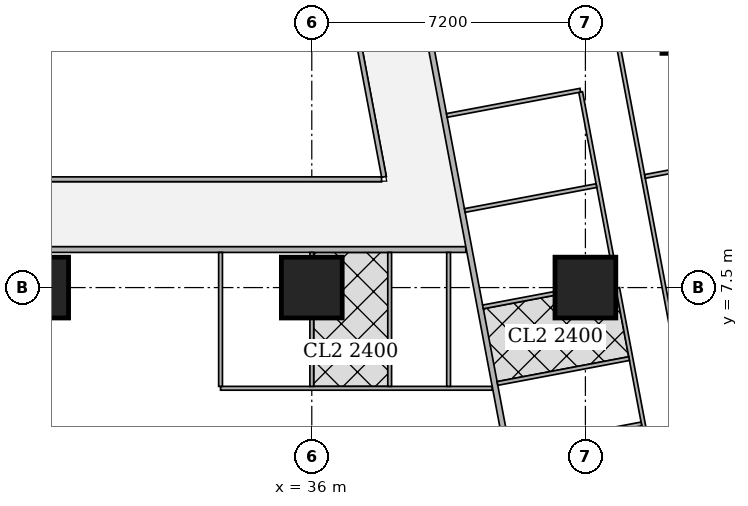
"""IFC4 building model, lengths in metres.
Left out: names, types, materials, properties, quantities, classifications, styles, units other than length and angle.
Written with IfcOpenShell. Run it as: python <this file> out.ifc"""

import sys

from ifc_helpers import new_model, si_unit, direction, frame, frame_2d, origin, origin_2d, place, context, subcontext, project, spatial, rectangle, extrude, element, fill, save


model = new_model("IFC4")
c1 = context("Model", 3, precision=1e-05, world=origin(), true_north=direction((0.0, 1.0)))
c2 = subcontext(c1, "Body", "Model", "MODEL_VIEW")
j1 = project(units=[si_unit("LENGTHUNIT", "METRE"), si_unit("PLANEANGLEUNIT", "RADIAN")], contexts=[c1])
p1 = place(None, origin())
s1 = spatial("IfcSite", under=j1, at=p1, CompositionType="ELEMENT")
p2 = place(p1, origin())
s2 = spatial("IfcBuilding", under=s1, at=p2, CompositionType="ELEMENT")
p3 = place(p2, frame((0.0, 0.0, 111.65)))
s3 = spatial("IfcBuildingStorey", under=s2, at=p3, CompositionType="ELEMENT", Elevation=111.65)
for number, where, z_axis, x_axis in (
    (1, (28.8, 7.5, 0.0), (0.0, 0.0, 1.0), (1.0, 0.0, 0.0)),
    (2, (36.0, 7.5, 0.0), (0.0, 0.0, 1.0), (1.0, 0.0, 0.0)),
    (3, (43.2, 7.5, 0.0), (0.0, 0.0, 1.0), (1.0, 0.0, 0.0)),
):
    element("IfcColumn", number, at=place(p3, frame(where, z_axis=z_axis, x_axis=x_axis)), inside=s3, PredefinedType="COLUMN", context=c2, shape_type="SweptSolid", body=[
        extrude(rectangle(XDim=1.6, YDim=1.6, at=origin_2d()), origin(), (0.0, 0.0, 1.0), 3.75),
    ])
p4 = place(p3, frame((46.314, 14.763, 0.0), z_axis=(0.0, 0.0, 1.0), x_axis=(1.0, 0.0, 0.0)))
e4 = element("IfcColumn", 4, at=p4, inside=s3, PredefinedType="COLUMN", context=c2, shape_type="SweptSolid", body=[
    extrude(rectangle(XDim=2.2, YDim=2.2, at=origin_2d()), origin(), (0.0, 0.0, 1.0), 3.75),
])
p5 = place(p3, frame((50.653, 2.703, 0.0), z_axis=(0.0, 0.0, 1.0), x_axis=(-0.185612026696, 0.982623109613, 0.0)))
e5 = element("IfcWall", 5, at=p5, inside=s3, PredefinedType="SOLIDWALL", context=c2, shape_type="SweptSolid", body=[
    extrude(rectangle(XDim=41.393, YDim=0.2, at=frame_2d((20.697, 0.0))), origin(), (0.0, 0.0, 1.0), 3.5),
])
p6 = place(p5, frame((1.633, 0.0, 0.9)))
e6 = element("IfcOpeningElement", 6, at=p6, cuts=e5, PredefinedType="OPENING", context=c2, shape_type="SweptSolid", body=[
    extrude(rectangle(XDim=1.8, YDim=1.5, at=frame_2d((0.9, 0.75))), frame((0.0, 0.11, 0.0), z_axis=(0.0, -1.0, 0.0), x_axis=(1.0, 0.0, 0.0)), (0.0, 0.0, 1.0), 0.22),
])
p7 = place(p5, frame((6.032, 0.0, 0.9)))
e7 = element("IfcOpeningElement", 7, at=p7, cuts=e5, PredefinedType="OPENING", context=c2, shape_type="SweptSolid", body=[
    extrude(rectangle(XDim=1.8, YDim=1.5, at=frame_2d((0.9, 0.75))), frame((0.0, 0.11, 0.0), z_axis=(0.0, -1.0, 0.0), x_axis=(1.0, 0.0, 0.0)), (0.0, 0.0, 1.0), 0.22),
])
p8 = place(p5, frame((9.848, 0.0, 0.9)))
e8 = element("IfcOpeningElement", 8, at=p8, cuts=e5, PredefinedType="OPENING", context=c2, shape_type="SweptSolid", body=[
    extrude(rectangle(XDim=1.8, YDim=1.5, at=frame_2d((0.9, 0.75))), frame((0.0, 0.11, 0.0), z_axis=(0.0, -1.0, 0.0), x_axis=(1.0, 0.0, 0.0)), (0.0, 0.0, 1.0), 0.22),
])
p9 = place(p5, frame((13.664, 0.0, 0.9)))
e9 = element("IfcOpeningElement", 9, at=p9, cuts=e5, PredefinedType="OPENING", context=c2, shape_type="SweptSolid", body=[
    extrude(rectangle(XDim=1.8, YDim=1.5, at=frame_2d((0.9, 0.75))), frame((0.0, 0.11, 0.0), z_axis=(0.0, -1.0, 0.0), x_axis=(1.0, 0.0, 0.0)), (0.0, 0.0, 1.0), 0.22),
])
p10 = place(p5, frame((17.481, 0.0, 0.9)))
e10 = element("IfcOpeningElement", 10, at=p10, cuts=e5, PredefinedType="OPENING", context=c2, shape_type="SweptSolid", body=[
    extrude(rectangle(XDim=1.8, YDim=1.5, at=frame_2d((0.9, 0.75))), frame((0.0, 0.11, 0.0), z_axis=(0.0, -1.0, 0.0), x_axis=(1.0, 0.0, 0.0)), (0.0, 0.0, 1.0), 0.22),
])
p11 = place(p5, frame((21.297, 0.0, 0.9)))
e11 = element("IfcOpeningElement", 11, at=p11, cuts=e5, PredefinedType="OPENING", context=c2, shape_type="SweptSolid", body=[
    extrude(rectangle(XDim=1.8, YDim=1.5, at=frame_2d((0.9, 0.75))), frame((0.0, 0.11, 0.0), z_axis=(0.0, -1.0, 0.0), x_axis=(1.0, 0.0, 0.0)), (0.0, 0.0, 1.0), 0.22),
])
p12 = place(p5, frame((25.113, 0.0, 0.9)))
e12 = element("IfcOpeningElement", 12, at=p12, cuts=e5, PredefinedType="OPENING", context=c2, shape_type="SweptSolid", body=[
    extrude(rectangle(XDim=1.8, YDim=1.5, at=frame_2d((0.9, 0.75))), frame((0.0, 0.11, 0.0), z_axis=(0.0, -1.0, 0.0), x_axis=(1.0, 0.0, 0.0)), (0.0, 0.0, 1.0), 0.22),
])
p13 = place(p5, frame((28.93, 0.0, 0.9)))
e13 = element("IfcOpeningElement", 13, at=p13, cuts=e5, PredefinedType="OPENING", context=c2, shape_type="SweptSolid", body=[
    extrude(rectangle(XDim=1.8, YDim=1.5, at=frame_2d((0.9, 0.75))), frame((0.0, 0.11, 0.0), z_axis=(0.0, -1.0, 0.0), x_axis=(1.0, 0.0, 0.0)), (0.0, 0.0, 1.0), 0.22),
])
p14 = place(p5, frame((32.746, 0.0, 0.9)))
e14 = element("IfcOpeningElement", 14, at=p14, cuts=e5, PredefinedType="OPENING", context=c2, shape_type="SweptSolid", body=[
    extrude(rectangle(XDim=1.8, YDim=1.5, at=frame_2d((0.9, 0.75))), frame((0.0, 0.11, 0.0), z_axis=(0.0, -1.0, 0.0), x_axis=(1.0, 0.0, 0.0)), (0.0, 0.0, 1.0), 0.22),
])
p15 = place(p5, frame((36.481, 0.0, 0.9)))
e15 = element("IfcOpeningElement", 15, at=p15, cuts=e5, PredefinedType="OPENING", context=c2, shape_type="SweptSolid", body=[
    extrude(rectangle(XDim=1.8, YDim=1.5, at=frame_2d((0.9, 0.75))), frame((0.0, 0.11, 0.0), z_axis=(0.0, -1.0, 0.0), x_axis=(1.0, 0.0, 0.0)), (0.0, 0.0, 1.0), 0.22),
])
p16 = place(p3, frame((40.053, 8.5, 0.0), z_axis=(0.0, 0.0, 1.0), x_axis=(-1.0, 0.0, 0.0)))
e16 = element("IfcWall", 16, at=p16, inside=s3, PredefinedType="SOLIDWALL", context=c2, shape_type="SweptSolid", body=[
    extrude(rectangle(XDim=31.703, YDim=0.15, at=frame_2d((15.852, 0.0))), origin(), (0.0, 0.0, 1.0), 3.5),
])
p17 = place(p16, frame((28.103, 0.0, 0.0)))
e17 = element("IfcOpeningElement", 17, at=p17, cuts=e16, PredefinedType="OPENING", context=c2, shape_type="SweptSolid", body=[
    extrude(rectangle(XDim=1.0, YDim=2.1, at=frame_2d((0.5, 1.05))), frame((0.0, 0.085, 0.0), z_axis=(0.0, -1.0, 0.0), x_axis=(1.0, 0.0, 0.0)), (0.0, 0.0, 1.0), 0.17),
])
p18 = place(p16, frame((19.754, 0.0, 0.0)))
e18 = element("IfcOpeningElement", 18, at=p18, cuts=e16, PredefinedType="OPENING", context=c2, shape_type="SweptSolid", body=[
    extrude(rectangle(XDim=1.0, YDim=2.1, at=frame_2d((0.5, 1.05))), frame((0.0, 0.085, 0.0), z_axis=(0.0, -1.0, 0.0), x_axis=(1.0, 0.0, 0.0)), (0.0, 0.0, 1.0), 0.17),
])
p19 = place(p16, frame((8.353, 0.0, 0.0)))
e19 = element("IfcOpeningElement", 19, at=p19, cuts=e16, PredefinedType="OPENING", context=c2, shape_type="SweptSolid", body=[
    extrude(rectangle(XDim=1.0, YDim=2.1, at=frame_2d((0.5, 1.05))), frame((0.0, 0.085, 0.0), z_axis=(0.0, -1.0, 0.0), x_axis=(1.0, 0.0, 0.0)), (0.0, 0.0, 1.0), 0.17),
])
p20 = place(p3, frame((33.127, 45.65, 0.0), z_axis=(0.0, 0.0, 1.0), x_axis=(0.185598547723, -0.98262565562, 0.0)))
e20 = element("IfcWall", 20, at=p20, inside=s3, PredefinedType="SOLIDWALL", context=c2, shape_type="SweptSolid", body=[
    extrude(rectangle(XDim=47.118, YDim=0.15, at=frame_2d((23.559, 0.0))), origin(), (0.0, 0.0, 1.0), 2.2),
])
p21 = place(p20, frame((20.373, 0.0, 0.0)))
e21 = element("IfcOpeningElement", 21, at=p21, cuts=e20, PredefinedType="OPENING", context=c2, shape_type="SweptSolid", body=[
    extrude(rectangle(XDim=1.0, YDim=2.1, at=frame_2d((0.5, 1.05))), frame((0.0, 0.085, 0.0), z_axis=(0.0, -1.0, 0.0), x_axis=(1.0, 0.0, 0.0)), (0.0, 0.0, 1.0), 0.17),
])
p22 = place(p20, frame((24.188, 0.0, 0.0)))
e22 = element("IfcOpeningElement", 22, at=p22, cuts=e20, PredefinedType="OPENING", context=c2, shape_type="SweptSolid", body=[
    extrude(rectangle(XDim=1.0, YDim=2.1, at=frame_2d((0.5, 1.05))), frame((0.0, 0.085, 0.0), z_axis=(0.0, -1.0, 0.0), x_axis=(1.0, 0.0, 0.0)), (0.0, 0.0, 1.0), 0.17),
])
p23 = place(p20, frame((32.608, 0.0, 0.0)))
e23 = element("IfcOpeningElement", 23, at=p23, cuts=e20, PredefinedType="OPENING", context=c2, shape_type="SweptSolid", body=[
    extrude(rectangle(XDim=1.0, YDim=2.1, at=frame_2d((0.5, 1.05))), frame((0.0, 0.085, 0.0), z_axis=(0.0, -1.0, 0.0), x_axis=(1.0, 0.0, 0.0)), (0.0, 0.0, 1.0), 0.17),
])
p24 = place(p3, frame((40.747, 4.85, 0.0), z_axis=(0.0, 0.0, 1.0), x_axis=(-1.0, 0.0, 0.0)))
e24 = element("IfcWall", 24, at=p24, inside=s3, PredefinedType="PARTITIONING", context=c2, shape_type="SweptSolid", body=[
    extrude(rectangle(XDim=7.148, YDim=0.1, at=frame_2d((3.574, 0.0))), origin(), (0.0, 0.0, 1.0), 3.5),
])
p25 = place(p24, frame((5.498, 0.0, 0.0)))
e25 = element("IfcOpeningElement", 25, at=p25, cuts=e24, PredefinedType="OPENING", context=c2, shape_type="SweptSolid", body=[
    extrude(rectangle(XDim=0.9, YDim=2.1, at=frame_2d((0.45, 1.05))), frame((0.0, 0.06, 0.0), z_axis=(0.0, -1.0, 0.0), x_axis=(1.0, 0.0, 0.0)), (0.0, 0.0, 1.0), 0.12),
])
p26 = place(p24, frame((3.272, 0.0, 0.0)))
e26 = element("IfcOpeningElement", 26, at=p26, cuts=e24, PredefinedType="OPENING", context=c2, shape_type="SweptSolid", body=[
    extrude(rectangle(XDim=0.9, YDim=2.1, at=frame_2d((0.45, 1.05))), frame((0.0, 0.06, 0.0), z_axis=(0.0, -1.0, 0.0), x_axis=(1.0, 0.0, 0.0)), (0.0, 0.0, 1.0), 0.12),
])
p27 = place(p24, frame((0.15, 0.0, 0.0)))
e27 = element("IfcOpeningElement", 27, at=p27, cuts=e24, PredefinedType="OPENING", context=c2, shape_type="SweptSolid", body=[
    extrude(rectangle(XDim=0.9, YDim=2.1, at=frame_2d((0.45, 1.05))), frame((0.0, 0.06, 0.0), z_axis=(0.0, -1.0, 0.0), x_axis=(1.0, 0.0, 0.0)), (0.0, 0.0, 1.0), 0.12),
])
p28 = place(p24, frame((1.472, 0.0, 0.0)))
e28 = element("IfcOpeningElement", 28, at=p28, cuts=e24, PredefinedType="OPENING", context=c2, shape_type="SweptSolid", body=[
    extrude(rectangle(XDim=0.9, YDim=2.1, at=frame_2d((0.45, 1.05))), frame((0.0, 0.06, 0.0), z_axis=(0.0, -1.0, 0.0), x_axis=(1.0, 0.0, 0.0)), (0.0, 0.0, 1.0), 0.12),
])
p29 = place(p3, frame((33.599, 4.9, 0.0), z_axis=(0.0, 0.0, 1.0), x_axis=(0.0, 1.0, 0.0)))
e29 = element("IfcWall", 29, at=p29, inside=s3, PredefinedType="PARTITIONING", context=c2, shape_type="SweptSolid", body=[
    extrude(rectangle(XDim=3.525, YDim=0.1, at=frame_2d((1.763, 0.0))), origin(), (0.0, 0.0, 1.0), 3.5),
])
p30 = place(p3, frame((36.0, 4.9, 0.0), z_axis=(0.0, 0.0, 1.0), x_axis=(0.0, 1.0, 0.0)))
e30 = element("IfcWall", 30, at=p30, inside=s3, PredefinedType="PARTITIONING", context=c2, shape_type="SweptSolid", body=[
    extrude(rectangle(XDim=1.799, YDim=0.1, at=frame_2d((0.899, 0.0))), origin(), (0.0, 0.0, 1.0), 3.5),
])
p31 = place(p3, frame((36.0, 8.301, 0.0), z_axis=(0.0, 0.0, 1.0), x_axis=(0.0, 1.0, 0.0)))
e31 = element("IfcWall", 31, at=p31, inside=s3, PredefinedType="PARTITIONING", context=c2, shape_type="SweptSolid", body=[
    extrude(rectangle(XDim=0.124, YDim=0.1, at=frame_2d((0.062, 0.0))), origin(), (0.0, 0.0, 1.0), 3.5),
])
for number, where, z_axis, x_axis in (
    (32, (39.6, 4.9, 0.0), (0.0, 0.0, 1.0), (0.0, 1.0, 0.0)),
    (33, (38.05, 4.9, 0.0), (0.0, 0.0, 1.0), (0.0, 1.0, 0.0)),
):
    element("IfcWall", number, at=place(p3, frame(where, z_axis=z_axis, x_axis=x_axis)), inside=s3, PredefinedType="PARTITIONING", context=c2, shape_type="SweptSolid", body=[
        extrude(rectangle(XDim=3.525, YDim=0.1, at=frame_2d((1.763, 0.0))), origin(), (0.0, 0.0, 1.0), 3.5),
    ])
p32 = place(p3, frame((44.08, 13.794, 0.0), z_axis=(0.0, 0.0, 1.0), x_axis=(0.185608455357, -0.982623784212, 0.0)))
e34 = element("IfcWall", 34, at=p32, inside=s3, PredefinedType="PARTITIONING", context=c2, shape_type="SweptSolid", body=[
    extrude(rectangle(XDim=10.909, YDim=0.1, at=frame_2d((5.455, 0.0))), origin(), (0.0, 0.0, 1.0), 3.5),
])
p33 = place(p32, frame((1.094, 0.0, 0.0)))
e35 = element("IfcOpeningElement", 35, at=p33, cuts=e34, PredefinedType="OPENING", context=c2, shape_type="SweptSolid", body=[
    extrude(rectangle(XDim=0.9, YDim=2.1, at=frame_2d((0.45, 1.05))), frame((0.0, 0.06, 0.0), z_axis=(0.0, -1.0, 0.0), x_axis=(1.0, 0.0, 0.0)), (0.0, 0.0, 1.0), 0.12),
])
p34 = place(p32, frame((3.639, 0.0, 0.0)))
e36 = element("IfcOpeningElement", 36, at=p34, cuts=e34, PredefinedType="OPENING", context=c2, shape_type="SweptSolid", body=[
    extrude(rectangle(XDim=0.9, YDim=2.1, at=frame_2d((0.45, 1.05))), frame((0.0, 0.06, 0.0), z_axis=(0.0, -1.0, 0.0), x_axis=(1.0, 0.0, 0.0)), (0.0, 0.0, 1.0), 0.12),
])
p35 = place(p32, frame((8.05, 0.0, 0.0)))
e37 = element("IfcOpeningElement", 37, at=p35, cuts=e34, PredefinedType="OPENING", context=c2, shape_type="SweptSolid", body=[
    extrude(rectangle(XDim=0.9, YDim=2.1, at=frame_2d((0.45, 1.05))), frame((0.0, 0.06, 0.0), z_axis=(0.0, -1.0, 0.0), x_axis=(1.0, 0.0, 0.0)), (0.0, 0.0, 1.0), 0.12),
])
p36 = place(p3, frame((43.076, 12.644, 0.0), z_axis=(0.0, 0.0, 1.0), x_axis=(0.185705350074, -0.982605476757, 0.0)))
e38 = element("IfcWall", 38, at=p36, inside=s3, PredefinedType="PARTITIONING", context=c2, shape_type="SweptSolid", body=[
    extrude(rectangle(XDim=4.411, YDim=0.1, at=frame_2d((2.205, 0.0))), origin(), (0.0, 0.0, 1.0), 3.5),
])
p37 = place(p36, frame((0.773, 0.0, 0.0)))
e39 = element("IfcOpeningElement", 39, at=p37, cuts=e38, PredefinedType="OPENING", context=c2, shape_type="SweptSolid", body=[
    extrude(rectangle(XDim=0.9, YDim=2.1, at=frame_2d((0.45, 1.05))), frame((0.0, 0.06, 0.0), z_axis=(0.0, -1.0, 0.0), x_axis=(1.0, 0.0, 0.0)), (0.0, 0.0, 1.0), 0.12),
])
p38 = place(p3, frame((44.049, 7.491, 0.0), z_axis=(0.0, 0.0, 1.0), x_axis=(0.185628828844, -0.982619935632, 0.0)))
e40 = element("IfcWall", 40, at=p38, inside=s3, PredefinedType="PARTITIONING", context=c2, shape_type="SweptSolid", body=[
    extrude(rectangle(XDim=4.75, YDim=0.1, at=frame_2d((2.375, 0.0))), origin(), (0.0, 0.0, 1.0), 3.5),
])
p39 = place(p38, frame((0.8, 0.0, 0.0)))
e41 = element("IfcOpeningElement", 41, at=p39, cuts=e40, PredefinedType="OPENING", context=c2, shape_type="SweptSolid", body=[
    extrude(rectangle(XDim=0.9, YDim=2.1, at=frame_2d((0.45, 1.05))), frame((0.0, 0.06, 0.0), z_axis=(0.0, -1.0, 0.0), x_axis=(1.0, 0.0, 0.0)), (0.0, 0.0, 1.0), 0.12),
])
p40 = place(p38, frame((2.316, 0.0, 0.0)))
e42 = element("IfcOpeningElement", 42, at=p40, cuts=e40, PredefinedType="OPENING", context=c2, shape_type="SweptSolid", body=[
    extrude(rectangle(XDim=0.9, YDim=2.1, at=frame_2d((0.45, 1.05))), frame((0.0, 0.06, 0.0), z_axis=(0.0, -1.0, 0.0), x_axis=(1.0, 0.0, 0.0)), (0.0, 0.0, 1.0), 0.12),
])
p41 = place(p3, frame((48.943, 11.213, 0.0), z_axis=(0.0, 0.0, 1.0), x_axis=(-0.982623519589, -0.185609856287, 0.0)))
e43 = element("IfcWall", 43, at=p41, inside=s3, PredefinedType="PARTITIONING", context=c2, shape_type="SweptSolid", body=[
    extrude(rectangle(XDim=4.25, YDim=0.1, at=frame_2d((2.125, 0.0))), origin(), (0.0, 0.0, 1.0), 2.2),
])
p42 = place(p3, frame((43.067, 12.693, 0.0), z_axis=(0.0, 0.0, 1.0), x_axis=(-0.982598214409, -0.185743772548, 0.0)))
e44 = element("IfcWall", 44, at=p42, inside=s3, PredefinedType="PARTITIONING", context=c2, shape_type="SweptSolid", body=[
    extrude(rectangle(XDim=3.575, YDim=0.1, at=frame_2d((1.788, 0.0))), origin(), (0.0, 0.0, 1.0), 3.5),
])
p43 = place(p3, frame((43.49, 10.183, 0.0), z_axis=(0.0, 0.0, 1.0), x_axis=(-0.982588017646, -0.185797706064, 0.0)))
e45 = element("IfcWall", 45, at=p43, inside=s3, PredefinedType="PARTITIONING", context=c2, shape_type="SweptSolid", body=[
    extrude(rectangle(XDim=3.525, YDim=0.1, at=frame_2d((1.763, 0.0))), origin(), (0.0, 0.0, 1.0), 3.5),
])
p44 = place(p43, frame((1.325, 0.0, 0.0)))
e46 = element("IfcOpeningElement", 46, at=p44, cuts=e45, PredefinedType="OPENING", context=c2, shape_type="SweptSolid", body=[
    extrude(rectangle(XDim=0.9, YDim=2.1, at=frame_2d((0.45, 1.05))), frame((0.0, 0.06, 0.0), z_axis=(0.0, -1.0, 0.0), x_axis=(1.0, 0.0, 0.0)), (0.0, 0.0, 1.0), 0.12),
])
p45 = place(p3, frame((42.39, 7.347, 0.0), z_axis=(0.0, 0.0, 1.0), x_axis=(-0.982633642782, -0.185556255819, 0.0)))
e47 = element("IfcWall", 47, at=p45, inside=s3, PredefinedType="PARTITIONING", context=c2, shape_type="SweptSolid", body=[
    extrude(rectangle(XDim=1.918, YDim=0.1, at=frame_2d((0.959, 0.0))), origin(), (0.0, 0.0, 1.0), 3.5),
])
p46 = place(p3, frame((44.35, 5.631, 0.0), z_axis=(0.0, 0.0, 1.0), x_axis=(-0.982638553676, -0.185530247748, 0.0)))
e48 = element("IfcWall", 48, at=p46, inside=s3, PredefinedType="PARTITIONING", context=c2, shape_type="SweptSolid", body=[
    extrude(rectangle(XDim=3.525, YDim=0.1, at=frame_2d((1.763, 0.0))), origin(), (0.0, 0.0, 1.0), 3.5),
])
p47 = place(p3, frame((41.21, 3.258, 0.0), z_axis=(0.0, 0.0, 1.0), x_axis=(0.982638553676, 0.185530247748, 0.0)))
e49 = element("IfcWall", 49, at=p47, inside=s3, PredefinedType="PARTITIONING", context=c2, shape_type="SweptSolid", body=[
    extrude(rectangle(XDim=3.525, YDim=0.1, at=frame_2d((1.763, 0.0))), origin(), (0.0, 0.0, 1.0), 3.5),
])
p48 = place(p47, frame((1.65, 0.0, 0.0)))
e50 = element("IfcOpeningElement", 50, at=p48, cuts=e49, PredefinedType="OPENING", context=c2, shape_type="SweptSolid", body=[
    extrude(rectangle(XDim=0.9, YDim=2.1, at=frame_2d((0.45, 1.05))), frame((0.0, 0.06, 0.0), z_axis=(0.0, -1.0, 0.0), x_axis=(1.0, 0.0, 0.0)), (0.0, 0.0, 1.0), 0.12),
])
p49 = place(p3, frame((28.95, 10.35, 0.0), z_axis=(0.0, 0.0, 1.0), x_axis=(1.0, 0.0, 0.0)))
e51 = element("IfcWall", 51, at=p49, inside=s3, PredefinedType="PARTITIONING", context=c2, shape_type="SweptSolid", body=[
    extrude(rectangle(XDim=8.886, YDim=0.125, at=frame_2d((4.443, 0.0))), origin(), (0.0, 0.0, 1.0), 3.5),
])
p50 = place(p3, frame((37.9, 10.413, 0.0), z_axis=(0.0, 0.0, 1.0), x_axis=(-0.185513629891, 0.982641691119, 0.0)))
e52 = element("IfcWall", 52, at=p50, inside=s3, PredefinedType="PARTITIONING", context=c2, shape_type="SweptSolid", body=[
    extrude(rectangle(XDim=4.668, YDim=0.125, at=frame_2d((2.334, 0.0))), origin(), (0.0, 0.0, 1.0), 3.5),
])
p51 = place(p50, frame((0.708, 0.0, 0.0)))
e53 = element("IfcOpeningElement", 53, at=p51, cuts=e52, PredefinedType="OPENING", context=c2, shape_type="SweptSolid", body=[
    extrude(rectangle(XDim=1.0, YDim=2.1, at=frame_2d((0.5, 1.05))), frame((0.0, 0.073, 0.0), z_axis=(0.0, -1.0, 0.0), x_axis=(1.0, 0.0, 0.0)), (0.0, 0.0, 1.0), 0.145),
])
p52 = place(p25, origin())
e54 = element("IfcDoor", 54, at=p52, inside=s3, OperationType="SINGLE_SWING_LEFT", PredefinedType="DOOR", context=c2, shape_type="SweptSolid", body=[
    extrude(rectangle(XDim=0.9, YDim=2.1, at=frame_2d((0.45, 1.05))), frame((0.0, 0.025, 0.0), z_axis=(0.0, -1.0, 0.0), x_axis=(1.0, 0.0, 0.0)), (0.0, 0.0, 1.0), 0.05),
])
fill(e25, e54)
p53 = place(p26, origin())
e55 = element("IfcDoor", 55, at=p53, inside=s3, OperationType="SINGLE_SWING_RIGHT", PredefinedType="DOOR", context=c2, shape_type="SweptSolid", body=[
    extrude(rectangle(XDim=0.9, YDim=2.1, at=frame_2d((0.45, 1.05))), frame((0.0, 0.025, 0.0), z_axis=(0.0, -1.0, 0.0), x_axis=(1.0, 0.0, 0.0)), (0.0, 0.0, 1.0), 0.05),
])
fill(e26, e55)
p54 = place(p27, origin())
e56 = element("IfcDoor", 56, at=p54, inside=s3, OperationType="SINGLE_SWING_RIGHT", PredefinedType="DOOR", context=c2, shape_type="SweptSolid", body=[
    extrude(rectangle(XDim=0.9, YDim=2.1, at=frame_2d((0.45, 1.05))), frame((0.0, 0.025, 0.0), z_axis=(0.0, -1.0, 0.0), x_axis=(1.0, 0.0, 0.0)), (0.0, 0.0, 1.0), 0.05),
])
fill(e27, e56)
p55 = place(p28, origin())
e57 = element("IfcDoor", 57, at=p55, inside=s3, OperationType="SINGLE_SWING_LEFT", PredefinedType="DOOR", context=c2, shape_type="SweptSolid", body=[
    extrude(rectangle(XDim=0.9, YDim=2.1, at=frame_2d((0.45, 1.05))), frame((0.0, 0.025, 0.0), z_axis=(0.0, -1.0, 0.0), x_axis=(1.0, 0.0, 0.0)), (0.0, 0.0, 1.0), 0.05),
])
fill(e28, e57)
p56 = place(p19, origin())
e58 = element("IfcDoor", 58, at=p56, inside=s3, OperationType="SINGLE_SWING_RIGHT", PredefinedType="DOOR", context=c2, shape_type="SweptSolid", body=[
    extrude(rectangle(XDim=1.0, YDim=2.1, at=frame_2d((0.5, 1.05))), frame((0.0, 0.025, 0.0), z_axis=(0.0, -1.0, 0.0), x_axis=(1.0, 0.0, 0.0)), (0.0, 0.0, 1.0), 0.05),
])
fill(e19, e58)
p57 = place(p33, origin())
e59 = element("IfcDoor", 59, at=p57, inside=s3, OperationType="SINGLE_SWING_LEFT", PredefinedType="DOOR", context=c2, shape_type="SweptSolid", body=[
    extrude(rectangle(XDim=0.9, YDim=2.1, at=frame_2d((0.45, 1.05))), frame((0.0, 0.025, 0.0), z_axis=(0.0, -1.0, 0.0), x_axis=(1.0, 0.0, 0.0)), (0.0, 0.0, 1.0), 0.05),
])
fill(e35, e59)
p58 = place(p34, origin())
e60 = element("IfcDoor", 60, at=p58, inside=s3, OperationType="SINGLE_SWING_LEFT", PredefinedType="DOOR", context=c2, shape_type="SweptSolid", body=[
    extrude(rectangle(XDim=0.9, YDim=2.1, at=frame_2d((0.45, 1.05))), frame((0.0, 0.025, 0.0), z_axis=(0.0, -1.0, 0.0), x_axis=(1.0, 0.0, 0.0)), (0.0, 0.0, 1.0), 0.05),
])
fill(e36, e60)
p59 = place(p37, origin())
e61 = element("IfcDoor", 61, at=p59, inside=s3, OperationType="SINGLE_SWING_RIGHT", PredefinedType="DOOR", context=c2, shape_type="SweptSolid", body=[
    extrude(rectangle(XDim=0.9, YDim=2.1, at=frame_2d((0.45, 1.05))), frame((0.0, 0.025, 0.0), z_axis=(0.0, -1.0, 0.0), x_axis=(1.0, 0.0, 0.0)), (0.0, 0.0, 1.0), 0.05),
])
fill(e39, e61)
p60 = place(p39, origin())
e62 = element("IfcDoor", 62, at=p60, inside=s3, OperationType="SINGLE_SWING_LEFT", PredefinedType="DOOR", context=c2, shape_type="SweptSolid", body=[
    extrude(rectangle(XDim=0.9, YDim=2.1, at=frame_2d((0.45, 1.05))), frame((0.0, 0.025, 0.0), z_axis=(0.0, -1.0, 0.0), x_axis=(1.0, 0.0, 0.0)), (0.0, 0.0, 1.0), 0.05),
])
fill(e41, e62)
p61 = place(p40, origin())
e63 = element("IfcDoor", 63, at=p61, inside=s3, OperationType="SINGLE_SWING_LEFT", PredefinedType="DOOR", context=c2, shape_type="SweptSolid", body=[
    extrude(rectangle(XDim=0.9, YDim=2.1, at=frame_2d((0.45, 1.05))), frame((0.0, 0.025, 0.0), z_axis=(0.0, -1.0, 0.0), x_axis=(1.0, 0.0, 0.0)), (0.0, 0.0, 1.0), 0.05),
])
fill(e42, e63)
p62 = place(p23, origin())
e64 = element("IfcDoor", 64, at=p62, inside=s3, OperationType="SINGLE_SWING_LEFT", PredefinedType="DOOR", context=c2, shape_type="SweptSolid", body=[
    extrude(rectangle(XDim=1.0, YDim=2.1, at=frame_2d((0.5, 1.05))), frame((0.0, 0.025, 0.0), z_axis=(0.0, -1.0, 0.0), x_axis=(1.0, 0.0, 0.0)), (0.0, 0.0, 1.0), 0.05),
])
fill(e23, e64)
p63 = place(p44, origin())
e65 = element("IfcDoor", 65, at=p63, inside=s3, OperationType="SINGLE_SWING_LEFT", PredefinedType="DOOR", context=c2, shape_type="SweptSolid", body=[
    extrude(rectangle(XDim=0.9, YDim=2.1, at=frame_2d((0.45, 1.05))), frame((0.0, 0.025, 0.0), z_axis=(0.0, -1.0, 0.0), x_axis=(1.0, 0.0, 0.0)), (0.0, 0.0, 1.0), 0.05),
])
fill(e46, e65)
p64 = place(p51, origin())
e66 = element("IfcDoor", 66, at=p64, inside=s3, OperationType="SINGLE_SWING_LEFT", PredefinedType="DOOR", context=c2, shape_type="SweptSolid", body=[
    extrude(rectangle(XDim=1.0, YDim=2.1, at=frame_2d((0.5, 1.05))), frame((0.0, 0.025, 0.0), z_axis=(0.0, -1.0, 0.0), x_axis=(1.0, 0.0, 0.0)), (0.0, 0.0, 1.0), 0.05),
])
fill(e53, e66)
save(model, sys.argv[1])
